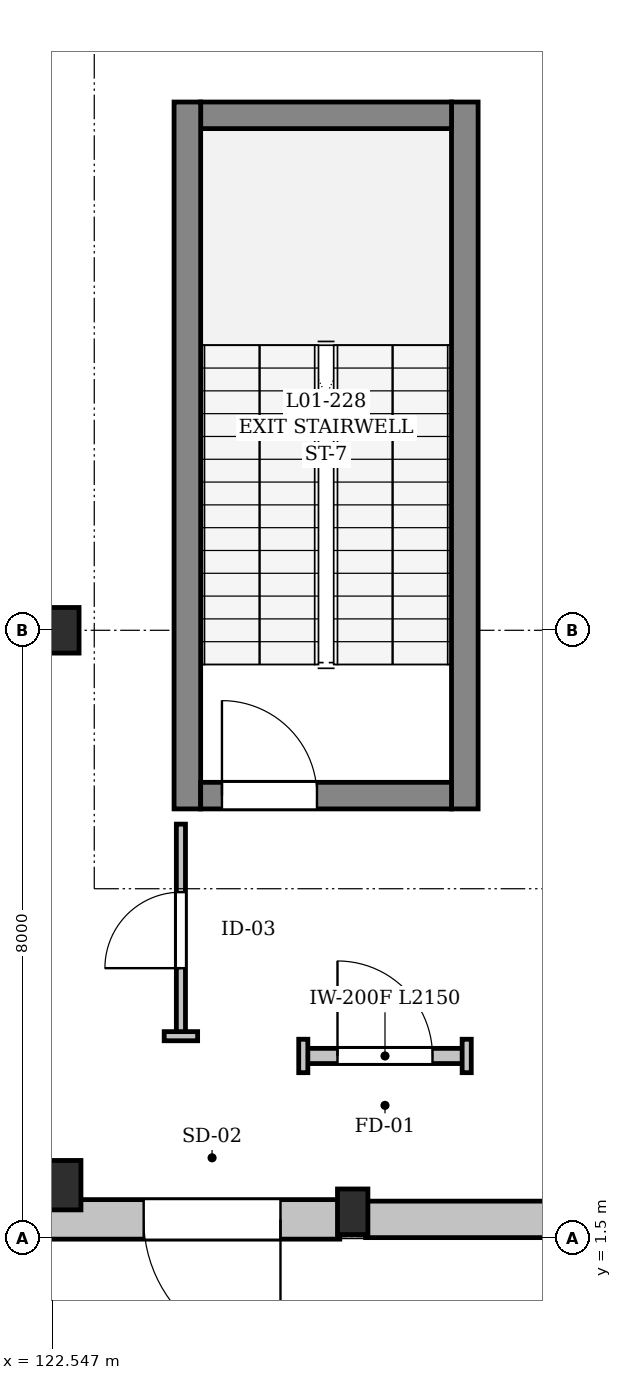
"""IFC4 building model, lengths in metres.
Left out: names, types, materials, properties, quantities, classifications, styles, units other than length and angle.
Written with IfcOpenShell. Run it as: python <this file> out.ifc"""

import sys

from ifc_helpers import new_model, si_unit, direction, frame, frame_2d, origin, origin_2d, place, context, subcontext, project, spatial, rectangle, extrude, element, fill, save


model = new_model("IFC4")
c1 = context("Model", 3, precision=1e-05, world=origin(), true_north=direction((0.0, 1.0)))
c2 = subcontext(c1, "Body", "Model", "MODEL_VIEW")
j1 = project(units=[si_unit("LENGTHUNIT", "METRE"), si_unit("PLANEANGLEUNIT", "RADIAN")], contexts=[c1])
p1 = place(None, origin())
s1 = spatial("IfcSite", under=j1, at=p1, CompositionType="ELEMENT")
p2 = place(p1, origin())
s2 = spatial("IfcBuilding", under=s1, at=p2, CompositionType="ELEMENT")
p3 = place(p2, origin())
s3 = spatial("IfcBuildingStorey", under=s2, at=p3, CompositionType="ELEMENT", Elevation=0.0)
p4 = place(p3, frame((122.6, 2.2, 0.0), z_axis=(0.0, 0.0, 1.0), x_axis=(1.0, 0.0, 0.0)))
e1 = element("IfcColumn", 1, at=p4, inside=s3, PredefinedType="COLUMN", context=c2, shape_type="SweptSolid", body=[
    extrude(rectangle(XDim=0.65, YDim=0.65, at=origin_2d()), origin(), (0.0, 0.0, 1.0), 5.05),
])
p5 = place(p3, frame((122.6, 9.5, 0.0), z_axis=(0.0, 0.0, 1.0), x_axis=(1.0, 0.0, 0.0)))
e2 = element("IfcColumn", 2, at=p5, inside=s3, PredefinedType="COLUMN", context=c2, shape_type="SweptSolid", body=[
    extrude(rectangle(XDim=0.6, YDim=0.6, at=origin_2d()), origin(), (0.0, 0.0, 1.0), 5.05),
])
p6 = place(p3, frame((126.5, 1.85, 0.0), z_axis=(0.0, 0.0, 1.0), x_axis=(1.0, 0.0, 0.0)))
e3 = element("IfcColumn", 3, at=p6, inside=s3, PredefinedType="PILASTER", context=c2, shape_type="SweptSolid", body=[
    extrude(rectangle(XDim=0.4, YDim=0.6, at=origin_2d()), origin(), (0.0, 0.0, 1.0), 5.05),
])
p7 = place(p3, frame((134.03, 1.75, 0.0), z_axis=(0.0, 0.0, 1.0), x_axis=(-1.0, 0.0, 0.0)))
e4 = element("IfcWall", 4, at=p7, inside=s3, PredefinedType="SOLIDWALL", context=c2, shape_type="SweptSolid", body=[
    extrude(rectangle(XDim=7.36, YDim=0.48, at=frame_2d((3.68, 0.0))), origin(), (0.0, 0.0, 1.0), 4.04),
])
p8 = place(p3, frame((126.33, 1.75, 0.0), z_axis=(0.0, 0.0, 1.0), x_axis=(-1.0, 0.0, 0.0)))
e5 = element("IfcWall", 5, at=p8, inside=s3, PredefinedType="SOLIDWALL", context=c2, shape_type="SweptSolid", body=[
    extrude(rectangle(XDim=11.16, YDim=0.52, at=frame_2d((5.58, 0.0))), origin(), (0.0, 0.0, 1.0), 3.84),
])
p9 = place(p8, frame((0.78, 0.0, 0.0)))
e6 = element("IfcOpeningElement", 6, at=p9, cuts=e5, PredefinedType="OPENING", context=c2, shape_type="SweptSolid", body=[
    extrude(rectangle(XDim=1.8, YDim=2.4, at=frame_2d((0.9, 1.2))), frame((0.0, 0.27, 0.0), z_axis=(0.0, -1.0, 0.0), x_axis=(1.0, 0.0, 0.0)), (0.0, 0.0, 1.0), 0.54),
])
p10 = place(p3, frame((127.975, 7.15, 0.0), z_axis=(0.0, 0.0, 1.0), x_axis=(0.0, 1.0, 0.0)))
e7 = element("IfcWall", 7, at=p10, inside=s3, PredefinedType="SHEAR", context=c2, shape_type="SweptSolid", body=[
    extrude(rectangle(XDim=9.3, YDim=0.35, at=frame_2d((4.65, 0.0))), origin(), (0.0, 0.0, 1.0), 5.05),
])
p11 = place(p3, frame((127.8, 16.275, 0.0), z_axis=(0.0, 0.0, 1.0), x_axis=(-1.0, 0.0, 0.0)))
e8 = element("IfcWall", 8, at=p11, inside=s3, PredefinedType="SHEAR", context=c2, shape_type="SweptSolid", body=[
    extrude(rectangle(XDim=3.3, YDim=0.35, at=frame_2d((1.65, 0.0))), origin(), (0.0, 0.0, 1.0), 5.05),
])
p12 = place(p3, frame((124.325, 16.45, 0.0), z_axis=(0.0, 0.0, 1.0), x_axis=(0.0, -1.0, 0.0)))
e9 = element("IfcWall", 9, at=p12, inside=s3, PredefinedType="SHEAR", context=c2, shape_type="SweptSolid", body=[
    extrude(rectangle(XDim=9.3, YDim=0.35, at=frame_2d((4.65, 0.0))), origin(), (0.0, 0.0, 1.0), 5.05),
])
p13 = place(p3, frame((124.5, 7.325, 0.0), z_axis=(0.0, 0.0, 1.0), x_axis=(1.0, 0.0, 0.0)))
e10 = element("IfcWall", 10, at=p13, inside=s3, PredefinedType="SHEAR", context=c2, shape_type="SweptSolid", body=[
    extrude(rectangle(XDim=3.3, YDim=0.35, at=frame_2d((1.65, 0.0))), origin(), (0.0, 0.0, 1.0), 5.05),
])
p14 = place(p13, frame((0.28, 0.0, 0.0)))
e11 = element("IfcOpeningElement", 11, at=p14, cuts=e10, PredefinedType="OPENING", context=c2, shape_type="SweptSolid", body=[
    extrude(rectangle(XDim=1.25, YDim=2.2, at=frame_2d((0.625, 1.1))), frame((0.0, 0.185, 0.0), z_axis=(0.0, -1.0, 0.0), x_axis=(1.0, 0.0, 0.0)), (0.0, 0.0, 1.0), 0.37),
])
p15 = place(p3, frame((125.85, 3.9, 0.0), z_axis=(0.0, 0.0, 1.0), x_axis=(1.0, 0.0, 0.0)))
e12 = element("IfcWall", 12, at=p15, inside=s3, PredefinedType="PARTITIONING", context=c2, shape_type="SweptSolid", body=[
    extrude(rectangle(XDim=2.15, YDim=0.2, at=frame_2d((1.075, 0.0))), origin(), (0.0, 0.0, 1.0), 5.05),
])
p16 = place(p15, frame((0.45, 0.0, 0.0)))
e13 = element("IfcOpeningElement", 13, at=p16, cuts=e12, PredefinedType="OPENING", context=c2, shape_type="SweptSolid", body=[
    extrude(rectangle(XDim=1.25, YDim=2.2, at=frame_2d((0.625, 1.1))), frame((0.0, 0.11, 0.0), z_axis=(0.0, -1.0, 0.0), x_axis=(1.0, 0.0, 0.0)), (0.0, 0.0, 1.0), 0.22),
])
p17 = place(p3, frame((124.24, 4.16, 0.0), z_axis=(0.0, 0.0, 1.0), x_axis=(0.0, 1.0, 0.0)))
e14 = element("IfcWall", 14, at=p17, inside=s3, PredefinedType="PARTITIONING", context=c2, shape_type="SweptSolid", body=[
    extrude(rectangle(XDim=2.79, YDim=0.12, at=frame_2d((1.395, 0.0))), origin(), (0.0, 0.0, 1.0), 5.05),
])
p18 = place(p17, frame((0.895, 0.0, 0.0)))
e15 = element("IfcOpeningElement", 15, at=p18, cuts=e14, PredefinedType="OPENING", context=c2, shape_type="SweptSolid", body=[
    extrude(rectangle(XDim=1.0, YDim=2.2, at=frame_2d((0.5, 1.1))), frame((0.0, 0.07, 0.0), z_axis=(0.0, -1.0, 0.0), x_axis=(1.0, 0.0, 0.0)), (0.0, 0.0, 1.0), 0.14),
])
for number, where, z_axis, x_axis in (
    (16, (125.85, 3.68, 0.0), (0.0, 0.0, 1.0), (0.0, 1.0, 0.0)),
    (17, (128.0, 3.68, 0.0), (0.0, 0.0, 1.0), (0.0, 1.0, 0.0)),
):
    element("IfcWall", number, at=place(p3, frame(where, z_axis=z_axis, x_axis=x_axis)), inside=s3, PredefinedType="PARTITIONING", context=c2, shape_type="SweptSolid", body=[
        extrude(rectangle(XDim=0.44, YDim=0.12, at=frame_2d((0.22, 0.0))), origin(), (0.0, 0.0, 1.0), 5.05),
    ])
p19 = place(p3, frame((124.46, 4.16, 0.0), z_axis=(0.0, 0.0, 1.0), x_axis=(-1.0, 0.0, 0.0)))
e18 = element("IfcWall", 18, at=p19, inside=s3, PredefinedType="PARTITIONING", context=c2, shape_type="SweptSolid", body=[
    extrude(rectangle(XDim=0.44, YDim=0.12, at=frame_2d((0.22, 0.0))), origin(), (0.0, 0.0, 1.0), 5.05),
])
p20 = place(p9, origin())
e19 = element("IfcDoor", 19, at=p20, inside=s3, OperationType="DOUBLE_DOOR_SINGLE_SWING", PredefinedType="DOOR", context=c2, shape_type="SweptSolid", body=[
    extrude(rectangle(XDim=1.8, YDim=2.4, at=frame_2d((0.9, 1.2))), frame((0.0, 0.025, 0.0), z_axis=(0.0, -1.0, 0.0), x_axis=(1.0, 0.0, 0.0)), (0.0, 0.0, 1.0), 0.05),
])
fill(e6, e19)
p21 = place(p14, origin())
e20 = element("IfcDoor", 20, at=p21, inside=s3, OperationType="SINGLE_SWING_RIGHT", PredefinedType="DOOR", context=c2, shape_type="SweptSolid", body=[
    extrude(rectangle(XDim=1.25, YDim=2.2, at=frame_2d((0.625, 1.1))), frame((0.0, 0.025, 0.0), z_axis=(0.0, -1.0, 0.0), x_axis=(1.0, 0.0, 0.0)), (0.0, 0.0, 1.0), 0.05),
])
fill(e11, e20)
p22 = place(p16, origin())
e21 = element("IfcDoor", 21, at=p22, inside=s3, OperationType="SINGLE_SWING_LEFT", PredefinedType="DOOR", context=c2, shape_type="SweptSolid", body=[
    extrude(rectangle(XDim=1.25, YDim=2.2, at=frame_2d((0.625, 1.1))), frame((0.0, 0.025, 0.0), z_axis=(0.0, -1.0, 0.0), x_axis=(1.0, 0.0, 0.0)), (0.0, 0.0, 1.0), 0.05),
])
fill(e13, e21)
p23 = place(p18, origin())
e22 = element("IfcDoor", 22, at=p23, inside=s3, OperationType="SINGLE_SWING_RIGHT", PredefinedType="DOOR", context=c2, shape_type="SweptSolid", body=[
    extrude(rectangle(XDim=1.0, YDim=2.2, at=frame_2d((0.5, 1.1))), frame((0.0, 0.025, 0.0), z_axis=(0.0, -1.0, 0.0), x_axis=(1.0, 0.0, 0.0)), (0.0, 0.0, 1.0), 0.05),
])
fill(e15, e22)
save(model, sys.argv[1])
